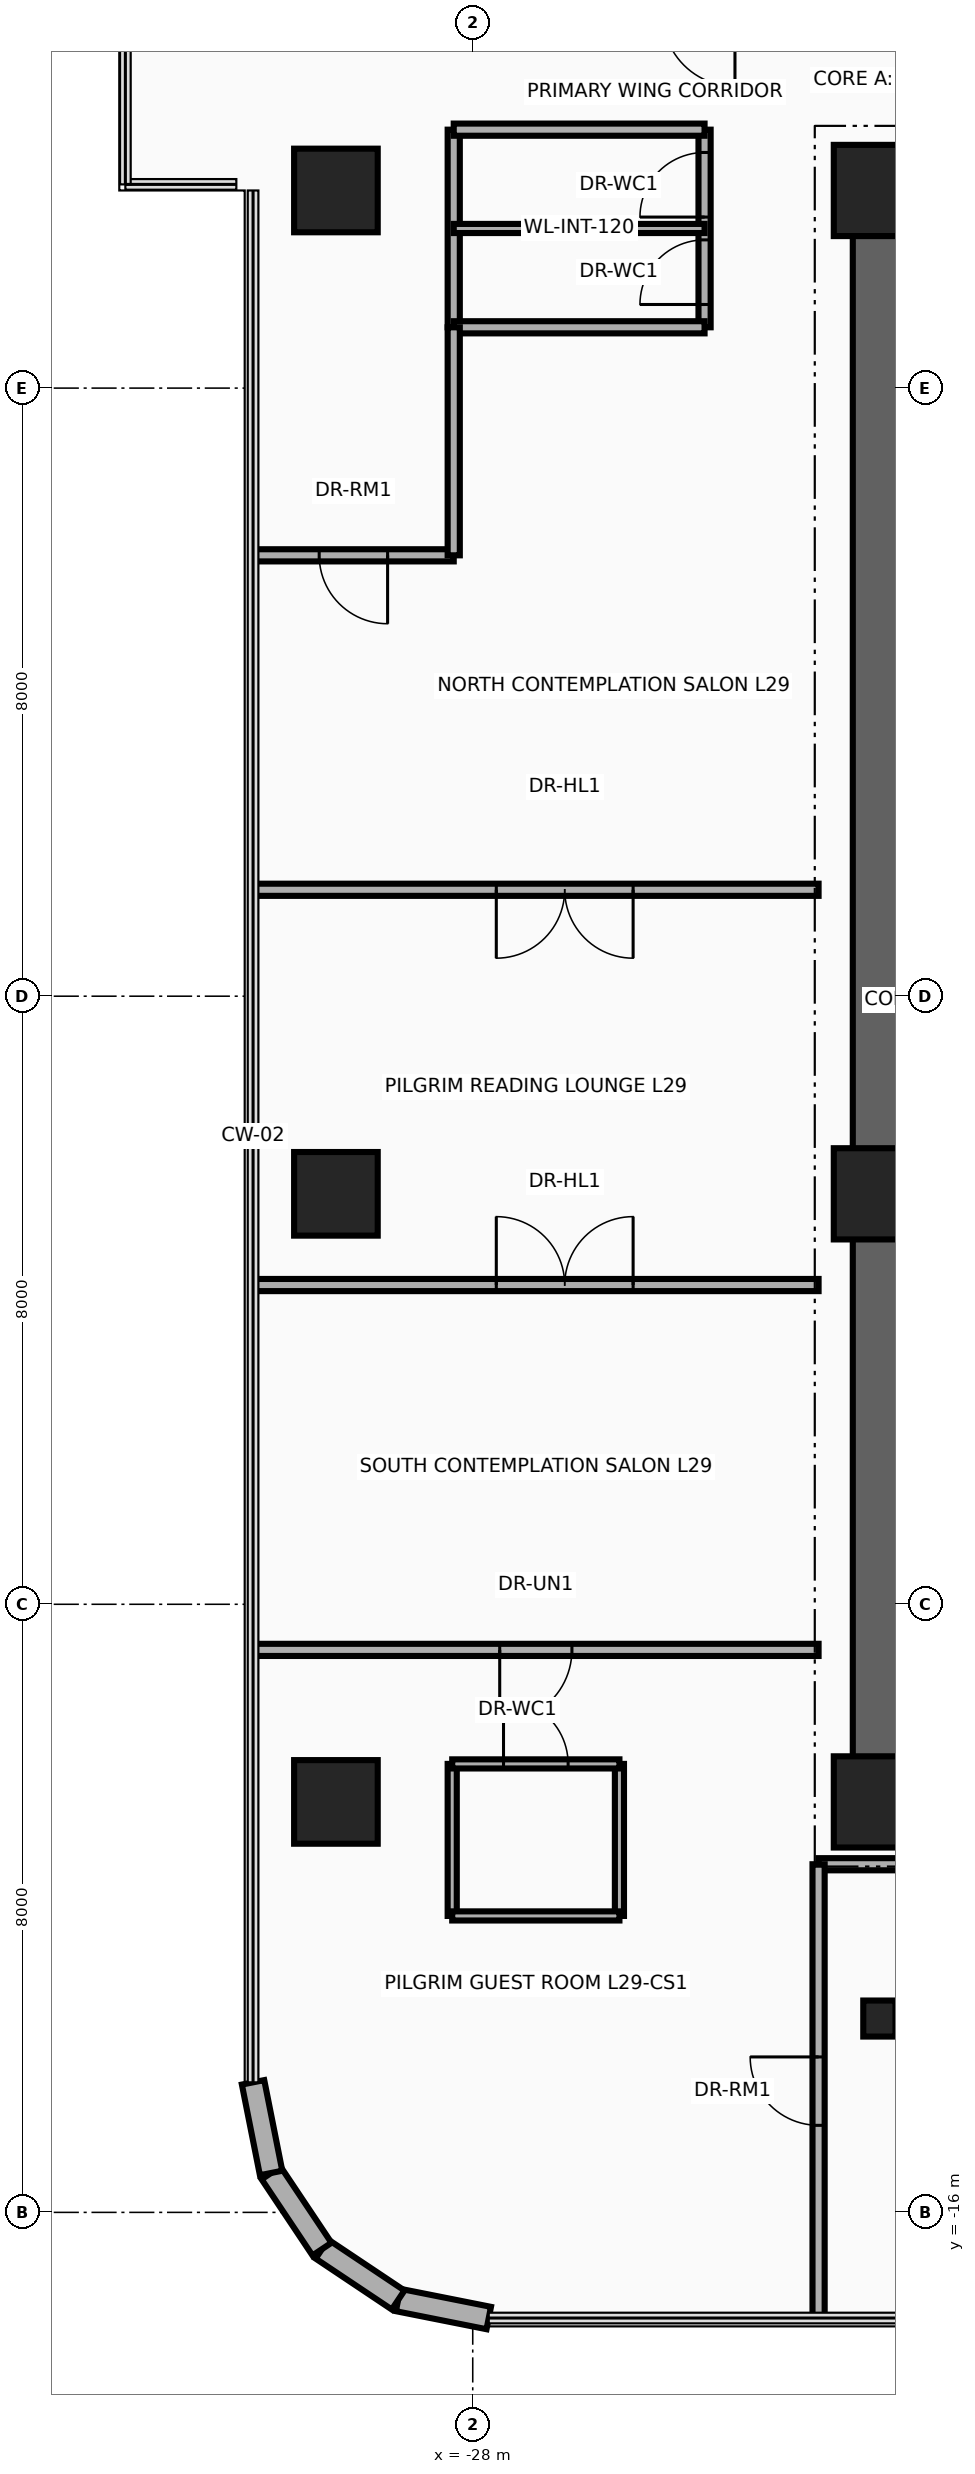
"""IFC4 building model, lengths in metres.
Left out: names, types, materials, properties, quantities, classifications, styles, units other than length and angle.
Written with IfcOpenShell. Run it as: python <this file> out.ifc"""

import sys

from ifc_helpers import new_model, si_unit, direction, frame, frame_2d, origin, origin_2d, place, context, subcontext, project, spatial, rectangle, circle, i_section, extrude, source, transform, mapped, element, fill, save


model = new_model("IFC4")
c1 = context("Model", 3, precision=1e-05, world=origin(), true_north=direction((0.0, 1.0)))
c2 = subcontext(c1, "Body", "Model", "MODEL_VIEW")
j1 = project(units=[si_unit("LENGTHUNIT", "METRE"), si_unit("PLANEANGLEUNIT", "RADIAN")], contexts=[c1])
p1 = place(None, origin())
s1 = spatial("IfcSite", under=j1, at=p1, CompositionType="ELEMENT")
p2 = place(p1, origin())
s2 = spatial("IfcBuilding", under=s1, at=p2, CompositionType="ELEMENT")
p3 = place(p2, frame((0.0, 0.0, 116.8)))
s3 = spatial("IfcBuildingStorey", under=s2, at=p3, CompositionType="ELEMENT", Elevation=116.8)
p4 = place(p3, frame((-22.65, -11.15, 0.0), z_axis=(0.0, 0.0, 1.0), x_axis=(0.0, 1.0, 0.0)))
e1 = element("IfcWall", 1, at=p4, inside=s3, PredefinedType="SHEAR", context=c2, shape_type="SweptSolid", body=[
    extrude(rectangle(XDim=22.3, YDim=0.7, at=frame_2d((11.15, 0.0))), origin(), (0.0, 0.0, 1.0), 3.46),
])
for number, where, z_axis, x_axis in (
    (2, (-22.65, 10.8, 0.0), (0.0, 0.0, 1.0), (1.0, 0.0, 0.0)),
    (3, (-22.65, -10.8, 0.0), (0.0, 0.0, 1.0), (1.0, 0.0, 0.0)),
):
    element("IfcWall", number, at=place(p3, frame(where, z_axis=z_axis, x_axis=x_axis)), inside=s3, PredefinedType="SHEAR", context=c2, shape_type="SweptSolid", body=[
        extrude(rectangle(XDim=10.25, YDim=0.7, at=frame_2d((5.125, 0.0))), origin(), (0.0, 0.0, 1.0), 3.46),
    ])
m1 = source(origin(), c2, "Body", "SweptSolid", [
    extrude(circle(Radius=0.55, at=origin_2d()), origin(), (0.0, 0.0, 1.0), 3.7),
])
p5 = place(p3, frame((-29.8, -10.6, 0.0), z_axis=(0.0, 0.0, 1.0), x_axis=(1.0, 0.0, 0.0)))
e4 = element("IfcColumn", 4, at=p5, inside=s3, PredefinedType="COLUMN", context=c2, shape_type="MappedRepresentation", body=[
    mapped(m1, transform((0.0, 0.0, 0.0), x_axis=(1.0, 0.0, 0.0), y_axis=(0.0, 1.0, 0.0), z_axis=(0.0, 0.0, 1.0), scale=1.0)),
])
m2 = source(origin(), c2, "Body", "SweptSolid", [
    extrude(rectangle(XDim=1.2, YDim=1.2, at=origin_2d()), origin(), (0.0, 0.0, 1.0), 3.7),
])
p6 = place(p3, frame((-22.65, -10.6, 0.0), z_axis=(0.0, 0.0, 1.0), x_axis=(1.0, 0.0, 0.0)))
e5 = element("IfcColumn", 5, at=p6, inside=s3, PredefinedType="COLUMN", context=c2, shape_type="MappedRepresentation", body=[
    mapped(m2, transform((0.0, 0.0, 0.0), x_axis=(1.0, 0.0, 0.0), y_axis=(0.0, 1.0, 0.0), z_axis=(0.0, 0.0, 1.0), scale=1.0)),
])
p7 = place(p3, frame((-29.8, -2.6, 0.0), z_axis=(0.0, 0.0, 1.0), x_axis=(1.0, 0.0, 0.0)))
e6 = element("IfcColumn", 6, at=p7, inside=s3, PredefinedType="COLUMN", context=c2, shape_type="MappedRepresentation", body=[
    mapped(m1, transform((0.0, 0.0, 0.0), x_axis=(1.0, 0.0, 0.0), y_axis=(0.0, 1.0, 0.0), z_axis=(0.0, 0.0, 1.0), scale=1.0)),
])
p8 = place(p3, frame((-22.65, -2.6, 0.0), z_axis=(0.0, 0.0, 1.0), x_axis=(1.0, 0.0, 0.0)))
e7 = element("IfcColumn", 7, at=p8, inside=s3, PredefinedType="COLUMN", context=c2, shape_type="MappedRepresentation", body=[
    mapped(m2, transform((0.0, 0.0, 0.0), x_axis=(1.0, 0.0, 0.0), y_axis=(0.0, 1.0, 0.0), z_axis=(0.0, 0.0, 1.0), scale=1.0)),
])
p9 = place(p3, frame((-29.8, 10.6, 0.0), z_axis=(0.0, 0.0, 1.0), x_axis=(1.0, 0.0, 0.0)))
e8 = element("IfcColumn", 8, at=p9, inside=s3, PredefinedType="COLUMN", context=c2, shape_type="MappedRepresentation", body=[
    mapped(m1, transform((0.0, 0.0, 0.0), x_axis=(1.0, 0.0, 0.0), y_axis=(0.0, 1.0, 0.0), z_axis=(0.0, 0.0, 1.0), scale=1.0)),
])
p10 = place(p3, frame((-22.65, 10.6, 0.0), z_axis=(0.0, 0.0, 1.0), x_axis=(1.0, 0.0, 0.0)))
e9 = element("IfcColumn", 9, at=p10, inside=s3, PredefinedType="COLUMN", context=c2, shape_type="MappedRepresentation", body=[
    mapped(m2, transform((0.0, 0.0, 0.0), x_axis=(1.0, 0.0, 0.0), y_axis=(0.0, 1.0, 0.0), z_axis=(0.0, 0.0, 1.0), scale=1.0)),
])
m3 = source(origin(), c2, "Body", "SweptSolid", [
    extrude(i_section(OverallWidth=0.424, OverallDepth=0.474, WebThickness=0.048, FlangeThickness=0.077, at=origin_2d()), origin(), (0.0, 0.0, 1.0), 3.7),
])
p11 = place(p3, frame((-22.65, -13.45, 0.0), z_axis=(0.0, 0.0, 1.0), x_axis=(1.0, 0.0, 0.0)))
e10 = element("IfcColumn", 10, at=p11, inside=s3, PredefinedType="COLUMN", context=c2, shape_type="MappedRepresentation", body=[
    mapped(m3, transform((0.0, 0.0, 0.0), x_axis=(1.0, 0.0, 0.0), y_axis=(0.0, 1.0, 0.0), z_axis=(0.0, 0.0, 1.0), scale=1.0)),
])
p12 = place(p3, frame((-27.789, -17.39, 0.0), z_axis=(0.0, 0.0, 1.0), x_axis=(-0.980804027463, 0.194996050505, 0.0)))
e11 = element("IfcWall", 11, at=p12, inside=s3, PredefinedType="SOLIDWALL", context=c2, shape_type="SweptSolid", body=[
    extrude(rectangle(XDim=1.216, YDim=0.3, at=frame_2d((0.608, 0.0))), origin(), (0.0, 0.0, 1.0), 3.46),
])
for number, where, z_axis, x_axis in (
    (12, (-28.982, -17.153, 0.0), (0.0, 0.0, 1.0), (-0.831, 0.556, 0.0)),
    (13, (-29.983, -16.483, 0.0), (0.0, 0.0, 1.0), (-0.556, 0.831, 0.0)),
):
    element("IfcWall", number, at=place(p3, frame(where, z_axis=z_axis, x_axis=x_axis)), inside=s3, PredefinedType="SOLIDWALL", context=c2, shape_type="SweptSolid", body=[
        extrude(rectangle(XDim=1.205, YDim=0.3, at=frame_2d((0.603, 0.0))), origin(), (0.0, 0.0, 1.0), 3.46),
    ])
p13 = place(p3, frame((-30.653, -15.482, 0.0), z_axis=(0.0, 0.0, 1.0), x_axis=(-0.194996050505, 0.980804027463, 0.0)))
e14 = element("IfcWall", 14, at=p13, inside=s3, PredefinedType="SOLIDWALL", context=c2, shape_type="SweptSolid", body=[
    extrude(rectangle(XDim=1.216, YDim=0.3, at=frame_2d((0.608, 0.0))), origin(), (0.0, 0.0, 1.0), 3.46),
])
p14 = place(p3, frame((-28.25, 8.8, 0.0), z_axis=(0.0, 0.0, 1.0), x_axis=(0.0, 1.0, 0.0)))
e15 = element("IfcWall", 15, at=p14, inside=s3, PredefinedType="PARTITIONING", context=c2, shape_type="SweptSolid", body=[
    extrude(rectangle(XDim=2.6, YDim=0.16, at=frame_2d((1.3, 0.0))), origin(), (0.0, 0.0, 1.0), 2.666),
])
p15 = place(p3, frame((-24.95, 8.8, 0.0), z_axis=(0.0, 0.0, 1.0), x_axis=(0.0, 1.0, 0.0)))
e16 = element("IfcWall", 16, at=p15, inside=s3, PredefinedType="PARTITIONING", context=c2, shape_type="SweptSolid", body=[
    extrude(rectangle(XDim=2.6, YDim=0.16, at=frame_2d((1.3, 0.0))), origin(), (0.0, 0.0, 1.0), 2.666),
])
p16 = place(p15, frame((0.3, 0.0, 0.0)))
e17 = element("IfcOpeningElement", 17, at=p16, cuts=e16, PredefinedType="OPENING", context=c2, shape_type="SweptSolid", body=[
    extrude(rectangle(XDim=0.85, YDim=2.1, at=frame_2d((0.425, 1.05))), frame((0.0, 0.095, 0.0), z_axis=(0.0, -1.0, 0.0), x_axis=(1.0, 0.0, 0.0)), (0.0, 0.0, 1.0), 0.19),
])
p17 = place(p15, frame((1.45, 0.0, 0.0)))
e18 = element("IfcOpeningElement", 18, at=p17, cuts=e16, PredefinedType="OPENING", context=c2, shape_type="SweptSolid", body=[
    extrude(rectangle(XDim=0.85, YDim=2.1, at=frame_2d((0.425, 1.05))), frame((0.0, 0.095, 0.0), z_axis=(0.0, -1.0, 0.0), x_axis=(1.0, 0.0, 0.0)), (0.0, 0.0, 1.0), 0.19),
])
for number, where, z_axis, x_axis in (
    (19, (-28.25, 8.8, 0.0), (0.0, 0.0, 1.0), (1.0, 0.0, 0.0)),
    (20, (-28.25, 11.4, 0.0), (0.0, 0.0, 1.0), (1.0, 0.0, 0.0)),
):
    element("IfcWall", number, at=place(p3, frame(where, z_axis=z_axis, x_axis=x_axis)), inside=s3, PredefinedType="PARTITIONING", context=c2, shape_type="SweptSolid", body=[
        extrude(rectangle(XDim=3.3, YDim=0.16, at=frame_2d((1.65, 0.0))), origin(), (0.0, 0.0, 1.0), 3.46),
    ])
p18 = place(p3, frame((-28.25, 10.1, 0.0), z_axis=(0.0, 0.0, 1.0), x_axis=(1.0, 0.0, 0.0)))
e21 = element("IfcWall", 21, at=p18, inside=s3, PredefinedType="PARTITIONING", context=c2, shape_type="SweptSolid", body=[
    extrude(rectangle(XDim=3.3, YDim=0.12, at=frame_2d((1.65, 0.0))), origin(), (0.0, 0.0, 1.0), 3.46),
])
p19 = place(p3, frame((-23.45, -11.42, 0.0), z_axis=(0.0, 0.0, 1.0), x_axis=(1.0, 0.0, 0.0)))
e22 = element("IfcWall", 22, at=p19, inside=s3, PredefinedType="PARTITIONING", context=c2, shape_type="SweptSolid", body=[
    extrude(rectangle(XDim=13.84, YDim=0.16, at=frame_2d((6.92, 0.0))), origin(), (0.0, 0.0, 1.0), 2.834),
])
p20 = place(p3, frame((-23.45, -17.39, 0.0), z_axis=(0.0, 0.0, 1.0), x_axis=(0.0, 1.0, 0.0)))
e23 = element("IfcWall", 23, at=p20, inside=s3, PredefinedType="PARTITIONING", context=c2, shape_type="SweptSolid", body=[
    extrude(rectangle(XDim=5.97, YDim=0.16, at=frame_2d((2.985, 0.0))), origin(), (0.0, 0.0, 1.0), 3.46),
])
p21 = place(p20, frame((2.535, 0.0, 0.0)))
e24 = element("IfcOpeningElement", 24, at=p21, cuts=e23, PredefinedType="OPENING", context=c2, shape_type="SweptSolid", body=[
    extrude(rectangle(XDim=0.9, YDim=2.1, at=frame_2d((0.45, 1.05))), frame((0.0, 0.095, 0.0), z_axis=(0.0, -1.0, 0.0), x_axis=(1.0, 0.0, 0.0)), (0.0, 0.0, 1.0), 0.19),
])
p22 = place(p3, frame((-30.89, -8.6, 0.0), z_axis=(0.0, 0.0, 1.0), x_axis=(1.0, 0.0, 0.0)))
e25 = element("IfcWall", 25, at=p22, inside=s3, PredefinedType="PARTITIONING", context=c2, shape_type="SweptSolid", body=[
    extrude(rectangle(XDim=7.44, YDim=0.16, at=frame_2d((3.72, 0.0))), origin(), (0.0, 0.0, 1.0), 2.896),
])
p23 = place(p22, frame((3.245, 0.0, 0.0)))
e26 = element("IfcOpeningElement", 26, at=p23, cuts=e25, PredefinedType="OPENING", context=c2, shape_type="SweptSolid", body=[
    extrude(rectangle(XDim=0.95, YDim=2.15, at=frame_2d((0.475, 1.075))), frame((0.0, 0.095, 0.0), z_axis=(0.0, -1.0, 0.0), x_axis=(1.0, 0.0, 0.0)), (0.0, 0.0, 1.0), 0.19),
])
p24 = place(p3, frame((-30.89, 5.8, 0.0), z_axis=(0.0, 0.0, 1.0), x_axis=(1.0, 0.0, 0.0)))
e27 = element("IfcWall", 27, at=p24, inside=s3, PredefinedType="PARTITIONING", context=c2, shape_type="SweptSolid", body=[
    extrude(rectangle(XDim=2.64, YDim=0.16, at=frame_2d((1.32, 0.0))), origin(), (0.0, 0.0, 1.0), 2.896),
])
p25 = place(p24, frame((0.87, 0.0, 0.0)))
e28 = element("IfcOpeningElement", 28, at=p25, cuts=e27, PredefinedType="OPENING", context=c2, shape_type="SweptSolid", body=[
    extrude(rectangle(XDim=0.9, YDim=2.1, at=frame_2d((0.45, 1.05))), frame((0.0, 0.095, 0.0), z_axis=(0.0, -1.0, 0.0), x_axis=(1.0, 0.0, 0.0)), (0.0, 0.0, 1.0), 0.19),
])
p26 = place(p3, frame((-28.25, 5.8, 0.0), z_axis=(0.0, 0.0, 1.0), x_axis=(0.0, 1.0, 0.0)))
e29 = element("IfcWall", 29, at=p26, inside=s3, PredefinedType="PARTITIONING", context=c2, shape_type="SweptSolid", body=[
    extrude(rectangle(XDim=3.0, YDim=0.16, at=frame_2d((1.5, 0.0))), origin(), (0.0, 0.0, 1.0), 2.988),
])
for number, where, z_axis, x_axis in (
    (30, (-28.27, -12.1, 0.0), (0.0, 0.0, 1.0), (0.0, 1.0, 0.0)),
    (31, (-26.07, -12.1, 0.0), (0.0, 0.0, 1.0), (0.0, 1.0, 0.0)),
):
    element("IfcWall", number, at=place(p3, frame(where, z_axis=z_axis, x_axis=x_axis)), inside=s3, PredefinedType="PARTITIONING", context=c2, shape_type="SweptSolid", body=[
        extrude(rectangle(XDim=2.0, YDim=0.12, at=frame_2d((1.0, 0.0))), origin(), (0.0, 0.0, 1.0), 2.666),
    ])
p27 = place(p3, frame((-28.27, -12.1, 0.0), z_axis=(0.0, 0.0, 1.0), x_axis=(1.0, 0.0, 0.0)))
e32 = element("IfcWall", 32, at=p27, inside=s3, PredefinedType="PARTITIONING", context=c2, shape_type="SweptSolid", body=[
    extrude(rectangle(XDim=2.2, YDim=0.12, at=frame_2d((1.1, 0.0))), origin(), (0.0, 0.0, 1.0), 3.46),
])
p28 = place(p3, frame((-28.27, -10.1, 0.0), z_axis=(0.0, 0.0, 1.0), x_axis=(1.0, 0.0, 0.0)))
e33 = element("IfcWall", 33, at=p28, inside=s3, PredefinedType="PARTITIONING", context=c2, shape_type="SweptSolid", body=[
    extrude(rectangle(XDim=2.2, YDim=0.12, at=frame_2d((1.1, 0.0))), origin(), (0.0, 0.0, 1.0), 3.46),
])
p29 = place(p28, frame((0.675, 0.0, 0.0)))
e34 = element("IfcOpeningElement", 34, at=p29, cuts=e33, PredefinedType="OPENING", context=c2, shape_type="SweptSolid", body=[
    extrude(rectangle(XDim=0.85, YDim=2.1, at=frame_2d((0.425, 1.05))), frame((0.0, 0.075, 0.0), z_axis=(0.0, -1.0, 0.0), x_axis=(1.0, 0.0, 0.0)), (0.0, 0.0, 1.0), 0.15),
])
p30 = place(p3, frame((-30.89, -3.8, 0.0), z_axis=(0.0, 0.0, 1.0), x_axis=(1.0, 0.0, 0.0)))
e35 = element("IfcWall", 35, at=p30, inside=s3, PredefinedType="PARTITIONING", context=c2, shape_type="SweptSolid", body=[
    extrude(rectangle(XDim=7.44, YDim=0.16, at=frame_2d((3.72, 0.0))), origin(), (0.0, 0.0, 1.0), 2.896),
])
p31 = place(p30, frame((3.2, 0.0, 0.0)))
e36 = element("IfcOpeningElement", 36, at=p31, cuts=e35, PredefinedType="OPENING", context=c2, shape_type="SweptSolid", body=[
    extrude(rectangle(XDim=1.8, YDim=2.15, at=frame_2d((0.9, 1.075))), frame((0.0, 0.095, 0.0), z_axis=(0.0, -1.0, 0.0), x_axis=(1.0, 0.0, 0.0)), (0.0, 0.0, 1.0), 0.19),
])
p32 = place(p3, frame((-30.89, 1.4, 0.0), z_axis=(0.0, 0.0, 1.0), x_axis=(1.0, 0.0, 0.0)))
e37 = element("IfcWall", 37, at=p32, inside=s3, PredefinedType="PARTITIONING", context=c2, shape_type="SweptSolid", body=[
    extrude(rectangle(XDim=7.44, YDim=0.16, at=frame_2d((3.72, 0.0))), origin(), (0.0, 0.0, 1.0), 2.896),
])
p33 = place(p32, frame((3.2, 0.0, 0.0)))
e38 = element("IfcOpeningElement", 38, at=p33, cuts=e37, PredefinedType="OPENING", context=c2, shape_type="SweptSolid", body=[
    extrude(rectangle(XDim=1.8, YDim=2.15, at=frame_2d((0.9, 1.075))), frame((0.0, 0.095, 0.0), z_axis=(0.0, -1.0, 0.0), x_axis=(1.0, 0.0, 0.0)), (0.0, 0.0, 1.0), 0.19),
])
p34 = place(p16, origin())
e39 = element("IfcDoor", 39, at=p34, inside=s3, OperationType="SINGLE_SWING_LEFT", PredefinedType="DOOR", context=c2, shape_type="SweptSolid", body=[
    extrude(rectangle(XDim=0.85, YDim=2.1, at=frame_2d((0.425, 1.05))), frame((0.0, 0.025, 0.0), z_axis=(0.0, -1.0, 0.0), x_axis=(1.0, 0.0, 0.0)), (0.0, 0.0, 1.0), 0.05),
])
fill(e17, e39)
p35 = place(p17, origin())
e40 = element("IfcDoor", 40, at=p35, inside=s3, OperationType="SINGLE_SWING_RIGHT", PredefinedType="DOOR", context=c2, shape_type="SweptSolid", body=[
    extrude(rectangle(XDim=0.85, YDim=2.1, at=frame_2d((0.425, 1.05))), frame((0.0, 0.025, 0.0), z_axis=(0.0, -1.0, 0.0), x_axis=(1.0, 0.0, 0.0)), (0.0, 0.0, 1.0), 0.05),
])
fill(e18, e40)
p36 = place(p23, frame((0.95, 0.0, 0.0), z_axis=(0.0, 0.0, 1.0), x_axis=(-1.0, 0.0, 0.0)))
e41 = element("IfcDoor", 41, at=p36, inside=s3, OperationType="SINGLE_SWING_LEFT", PredefinedType="DOOR", context=c2, shape_type="SweptSolid", body=[
    extrude(rectangle(XDim=0.95, YDim=2.15, at=frame_2d((0.475, 1.075))), frame((0.0, 0.025, 0.0), z_axis=(0.0, -1.0, 0.0), x_axis=(1.0, 0.0, 0.0)), (0.0, 0.0, 1.0), 0.05),
])
fill(e26, e41)
p37 = place(p29, origin())
e42 = element("IfcDoor", 42, at=p37, inside=s3, OperationType="SINGLE_SWING_RIGHT", PredefinedType="DOOR", context=c2, shape_type="SweptSolid", body=[
    extrude(rectangle(XDim=0.85, YDim=2.1, at=frame_2d((0.425, 1.05))), frame((0.0, 0.025, 0.0), z_axis=(0.0, -1.0, 0.0), x_axis=(1.0, 0.0, 0.0)), (0.0, 0.0, 1.0), 0.05),
])
fill(e34, e42)
p38 = place(p25, frame((0.9, 0.0, 0.0), z_axis=(0.0, 0.0, 1.0), x_axis=(-1.0, 0.0, 0.0)))
e43 = element("IfcDoor", 43, at=p38, inside=s3, OperationType="SINGLE_SWING_LEFT", PredefinedType="DOOR", context=c2, shape_type="SweptSolid", body=[
    extrude(rectangle(XDim=0.9, YDim=2.1, at=frame_2d((0.45, 1.05))), frame((0.0, 0.025, 0.0), z_axis=(0.0, -1.0, 0.0), x_axis=(1.0, 0.0, 0.0)), (0.0, 0.0, 1.0), 0.05),
])
fill(e28, e43)
p39 = place(p31, origin())
e44 = element("IfcDoor", 44, at=p39, inside=s3, OperationType="DOUBLE_DOOR_SINGLE_SWING", PredefinedType="DOOR", context=c2, shape_type="SweptSolid", body=[
    extrude(rectangle(XDim=1.8, YDim=2.15, at=frame_2d((0.9, 1.075))), frame((0.0, 0.025, 0.0), z_axis=(0.0, -1.0, 0.0), x_axis=(1.0, 0.0, 0.0)), (0.0, 0.0, 1.0), 0.05),
])
fill(e36, e44)
p40 = place(p33, frame((1.8, 0.0, 0.0), z_axis=(0.0, 0.0, 1.0), x_axis=(-1.0, 0.0, 0.0)))
e45 = element("IfcDoor", 45, at=p40, inside=s3, OperationType="DOUBLE_DOOR_SINGLE_SWING", PredefinedType="DOOR", context=c2, shape_type="SweptSolid", body=[
    extrude(rectangle(XDim=1.8, YDim=2.15, at=frame_2d((0.9, 1.075))), frame((0.0, 0.025, 0.0), z_axis=(0.0, -1.0, 0.0), x_axis=(1.0, 0.0, 0.0)), (0.0, 0.0, 1.0), 0.05),
])
fill(e38, e45)
p41 = place(p21, origin())
e46 = element("IfcDoor", 46, at=p41, inside=s3, OperationType="SINGLE_SWING_RIGHT", PredefinedType="DOOR", context=c2, shape_type="SweptSolid", body=[
    extrude(rectangle(XDim=0.9, YDim=2.1, at=frame_2d((0.45, 1.05))), frame((0.0, 0.025, 0.0), z_axis=(0.0, -1.0, 0.0), x_axis=(1.0, 0.0, 0.0)), (0.0, 0.0, 1.0), 0.05),
])
fill(e24, e46)
save(model, sys.argv[1])
